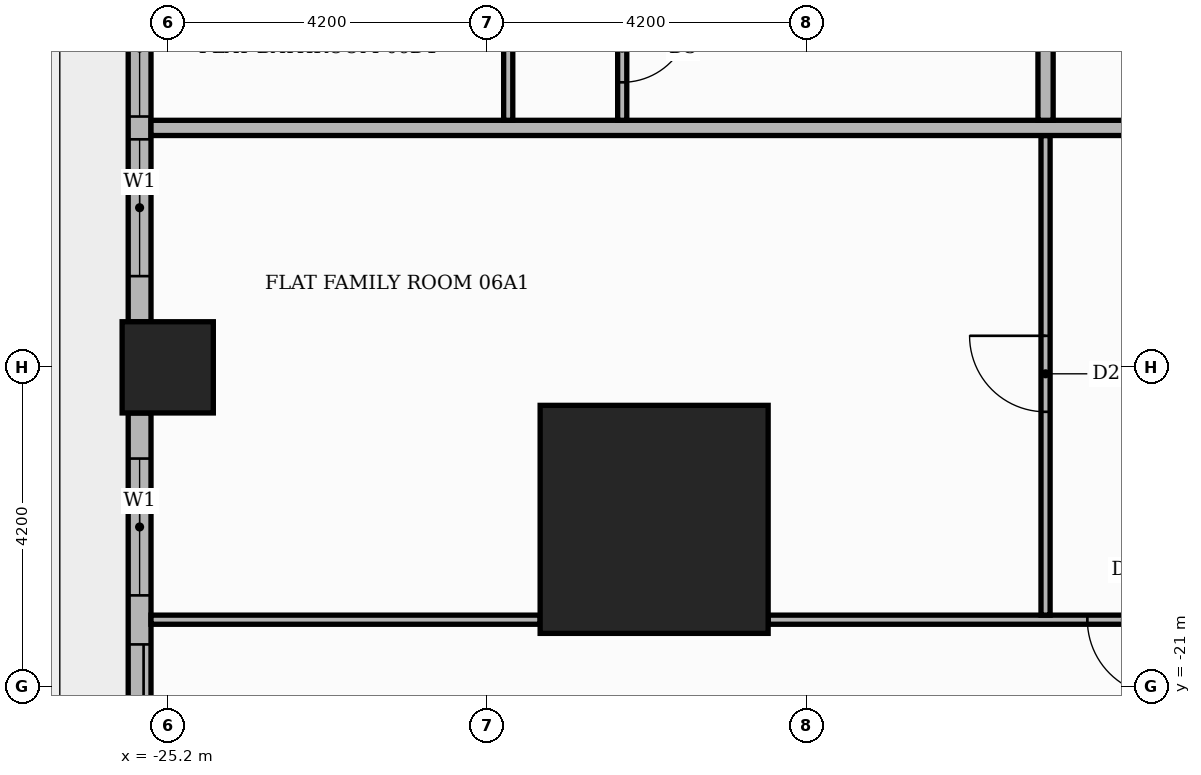
"""IFC4 building model, lengths in metres.
Left out: names, types, materials, properties, quantities, classifications, styles, units other than length and angle.
Written with IfcOpenShell. Run it as: python <this file> out.ifc"""

import sys

from ifc_helpers import new_model, si_unit, direction, frame, frame_2d, origin, origin_2d, place, context, subcontext, project, spatial, rectangle, extrude, element, fill, save


model = new_model("IFC4")
c1 = context("Model", 3, precision=1e-05, world=origin(), true_north=direction((0.0, 1.0)))
c2 = subcontext(c1, "Body", "Model", "MODEL_VIEW")
j1 = project(units=[si_unit("LENGTHUNIT", "METRE"), si_unit("PLANEANGLEUNIT", "RADIAN")], contexts=[c1])
p1 = place(None, origin())
s1 = spatial("IfcSite", under=j1, at=p1, CompositionType="ELEMENT")
p2 = place(p1, origin())
s2 = spatial("IfcBuilding", under=s1, at=p2, CompositionType="ELEMENT")
p3 = place(p2, frame((0.0, 0.0, 30.9)))
s3 = spatial("IfcBuildingStorey", under=s2, at=p3, CompositionType="ELEMENT", Elevation=30.9)
p4 = place(p3, frame((-18.8, -18.8, 0.0), z_axis=(0.0, 0.0, 1.0), x_axis=(1.0, 0.0, 0.0)))
e1 = element("IfcColumn", 1, at=p4, inside=s3, PredefinedType="COLUMN", context=c2, shape_type="SweptSolid", body=[
    extrude(rectangle(XDim=3.0, YDim=3.0, at=origin_2d()), origin(), (0.0, 0.0, 1.0), 3.9),
])
p5 = place(p3, frame((-25.2, -16.8, 0.0), z_axis=(0.0, 0.0, 1.0), x_axis=(1.0, 0.0, 0.0)))
e2 = element("IfcColumn", 2, at=p5, inside=s3, PredefinedType="COLUMN", context=c2, shape_type="SweptSolid", body=[
    extrude(rectangle(XDim=1.2, YDim=1.2, at=origin_2d()), origin(), (0.0, 0.0, 1.0), 3.9),
])
p6 = place(p3, frame((-25.57, -9.0, 0.0), z_axis=(0.0, 0.0, 1.0), x_axis=(0.0, -1.0, 0.0)))
e3 = element("IfcWall", 3, at=p6, inside=s3, PredefinedType="STANDARD", context=c2, shape_type="SweptSolid", body=[
    extrude(rectangle(XDim=7.2, YDim=0.3, at=frame_2d((3.6, 0.0))), origin(), (0.0, 0.0, 1.0), 3.48),
])
p7 = place(p6, frame((0.6, 0.0, 0.9)))
e4 = element("IfcOpeningElement", 4, at=p7, cuts=e3, PredefinedType="OPENING", context=c2, shape_type="SweptSolid", body=[
    extrude(rectangle(XDim=1.8, YDim=2.1, at=frame_2d((0.9, 1.05))), frame((0.0, 0.16, 0.0), z_axis=(0.0, -1.0, 0.0), x_axis=(1.0, 0.0, 0.0)), (0.0, 0.0, 1.0), 0.32),
])
p8 = place(p6, frame((2.7, 0.0, 0.9)))
e5 = element("IfcOpeningElement", 5, at=p8, cuts=e3, PredefinedType="OPENING", context=c2, shape_type="SweptSolid", body=[
    extrude(rectangle(XDim=1.8, YDim=2.1, at=frame_2d((0.9, 1.05))), frame((0.0, 0.16, 0.0), z_axis=(0.0, -1.0, 0.0), x_axis=(1.0, 0.0, 0.0)), (0.0, 0.0, 1.0), 0.32),
])
p9 = place(p6, frame((4.8, 0.0, 0.9)))
e6 = element("IfcOpeningElement", 6, at=p9, cuts=e3, PredefinedType="OPENING", context=c2, shape_type="SweptSolid", body=[
    extrude(rectangle(XDim=1.8, YDim=2.1, at=frame_2d((0.9, 1.05))), frame((0.0, 0.16, 0.0), z_axis=(0.0, -1.0, 0.0), x_axis=(1.0, 0.0, 0.0)), (0.0, 0.0, 1.0), 0.32),
])
p10 = place(p3, frame((-25.57, -17.4, 0.0), z_axis=(0.0, 0.0, 1.0), x_axis=(0.0, -1.0, 0.0)))
e7 = element("IfcWall", 7, at=p10, inside=s3, PredefinedType="STANDARD", context=c2, shape_type="SweptSolid", body=[
    extrude(rectangle(XDim=5.32, YDim=0.3, at=frame_2d((2.66, 0.0))), origin(), (0.0, 0.0, 1.0), 3.48),
])
p11 = place(p10, frame((0.6, 0.0, 0.9)))
e8 = element("IfcOpeningElement", 8, at=p11, cuts=e7, PredefinedType="OPENING", context=c2, shape_type="SweptSolid", body=[
    extrude(rectangle(XDim=1.8, YDim=2.1, at=frame_2d((0.9, 1.05))), frame((0.0, 0.16, 0.0), z_axis=(0.0, -1.0, 0.0), x_axis=(1.0, 0.0, 0.0)), (0.0, 0.0, 1.0), 0.32),
])
p12 = place(p10, frame((3.045, 0.0, 0.0)))
e9 = element("IfcOpeningElement", 9, at=p12, cuts=e7, PredefinedType="OPENING", context=c2, shape_type="SweptSolid", body=[
    extrude(rectangle(XDim=1.8, YDim=2.4, at=frame_2d((0.9, 1.2))), frame((0.0, 0.16, 0.0), z_axis=(0.0, -1.0, 0.0), x_axis=(1.0, 0.0, 0.0)), (0.0, 0.0, 1.0), 0.32),
])
p13 = place(p3, frame((-25.42, -20.12, 0.0), z_axis=(0.0, 0.0, 1.0), x_axis=(1.0, 0.0, 0.0)))
e10 = element("IfcWall", 10, at=p13, inside=s3, PredefinedType="PARTITIONING", context=c2, shape_type="SweptSolid", body=[
    extrude(rectangle(XDim=5.12, YDim=0.12, at=frame_2d((2.56, 0.0))), origin(), (0.0, 0.0, 1.0), 3.48),
])
p14 = place(p3, frame((-17.3, -20.12, 0.0), z_axis=(0.0, 0.0, 1.0), x_axis=(1.0, 0.0, 0.0)))
e11 = element("IfcWall", 11, at=p14, inside=s3, PredefinedType="PARTITIONING", context=c2, shape_type="SweptSolid", body=[
    extrude(rectangle(XDim=14.15, YDim=0.12, at=frame_2d((7.075, 0.0))), origin(), (0.0, 0.0, 1.0), 3.48),
])
p15 = place(p14, frame((4.2, 0.0, 0.0)))
e12 = element("IfcOpeningElement", 12, at=p15, cuts=e11, PredefinedType="OPENING", context=c2, shape_type="SweptSolid", body=[
    extrude(rectangle(XDim=1.0, YDim=2.1, at=frame_2d((0.5, 1.05))), frame((0.0, 0.07, 0.0), z_axis=(0.0, -1.0, 0.0), x_axis=(1.0, 0.0, 0.0)), (0.0, 0.0, 1.0), 0.14),
])
p16 = place(p14, frame((7.4, 0.0, 0.0)))
e13 = element("IfcOpeningElement", 13, at=p16, cuts=e11, PredefinedType="OPENING", context=c2, shape_type="SweptSolid", body=[
    extrude(rectangle(XDim=0.9, YDim=2.1, at=frame_2d((0.45, 1.05))), frame((0.0, 0.07, 0.0), z_axis=(0.0, -1.0, 0.0), x_axis=(1.0, 0.0, 0.0)), (0.0, 0.0, 1.0), 0.14),
])
p17 = place(p3, frame((-13.65, -20.06, 0.0), z_axis=(0.0, 0.0, 1.0), x_axis=(0.0, 1.0, 0.0)))
e14 = element("IfcWall", 14, at=p17, inside=s3, PredefinedType="PARTITIONING", context=c2, shape_type="SweptSolid", body=[
    extrude(rectangle(XDim=6.31, YDim=0.12, at=frame_2d((3.155, 0.0))), origin(), (0.0, 0.0, 1.0), 3.48),
])
p18 = place(p17, frame((2.675, 0.0, 0.0)))
e15 = element("IfcOpeningElement", 15, at=p18, cuts=e14, PredefinedType="OPENING", context=c2, shape_type="SweptSolid", body=[
    extrude(rectangle(XDim=1.0, YDim=2.1, at=frame_2d((0.5, 1.05))), frame((0.0, 0.07, 0.0), z_axis=(0.0, -1.0, 0.0), x_axis=(1.0, 0.0, 0.0)), (0.0, 0.0, 1.0), 0.14),
])
p19 = place(p3, frame((-25.42, -13.65, 0.0), z_axis=(0.0, 0.0, 1.0), x_axis=(1.0, 0.0, 0.0)))
e16 = element("IfcWall", 16, at=p19, inside=s3, PredefinedType="PARTITIONING", context=c2, shape_type="SweptSolid", body=[
    extrude(rectangle(XDim=39.07, YDim=0.2, at=frame_2d((19.535, 0.0))), origin(), (0.0, 0.0, 1.0), 3.48),
])
p20 = place(p19, frame((14.37, 0.0, 0.0)))
e17 = element("IfcOpeningElement", 17, at=p20, cuts=e16, PredefinedType="OPENING", context=c2, shape_type="SweptSolid", body=[
    extrude(rectangle(XDim=1.1, YDim=2.4, at=frame_2d((0.55, 1.2))), frame((0.0, 0.11, 0.0), z_axis=(0.0, -1.0, 0.0), x_axis=(1.0, 0.0, 0.0)), (0.0, 0.0, 1.0), 0.22),
])
p21 = place(p3, frame((-20.72, -13.55, 0.0), z_axis=(0.0, 0.0, 1.0), x_axis=(0.0, 1.0, 0.0)))
e18 = element("IfcWall", 18, at=p21, inside=s3, PredefinedType="PARTITIONING", context=c2, shape_type="SweptSolid", body=[
    extrude(rectangle(XDim=1.94, YDim=0.12, at=frame_2d((0.97, 0.0))), origin(), (0.0, 0.0, 1.0), 3.48),
])
p22 = place(p3, frame((-19.22, -13.55, 0.0), z_axis=(0.0, 0.0, 1.0), x_axis=(0.0, 1.0, 0.0)))
e19 = element("IfcWall", 19, at=p22, inside=s3, PredefinedType="PARTITIONING", context=c2, shape_type="SweptSolid", body=[
    extrude(rectangle(XDim=1.94, YDim=0.12, at=frame_2d((0.97, 0.0))), origin(), (0.0, 0.0, 1.0), 3.48),
])
p23 = place(p22, frame((0.5, 0.0, 0.0)))
e20 = element("IfcOpeningElement", 20, at=p23, cuts=e19, PredefinedType="OPENING", context=c2, shape_type="SweptSolid", body=[
    extrude(rectangle(XDim=0.9, YDim=2.1, at=frame_2d((0.45, 1.05))), frame((0.0, 0.07, 0.0), z_axis=(0.0, -1.0, 0.0), x_axis=(1.0, 0.0, 0.0)), (0.0, 0.0, 1.0), 0.14),
])
p24 = place(p3, frame((-13.65, -13.55, 0.0), z_axis=(0.0, 0.0, 1.0), x_axis=(0.0, 1.0, 0.0)))
e21 = element("IfcWall", 21, at=p24, inside=s3, PredefinedType="PARTITIONING", context=c2, shape_type="SweptSolid", body=[
    extrude(rectangle(XDim=27.1, YDim=0.2, at=frame_2d((13.55, 0.0))), origin(), (0.0, 0.0, 1.0), 3.48),
])
p25 = place(p24, frame((24.55, 0.0, 0.0)))
e22 = element("IfcOpeningElement", 22, at=p25, cuts=e21, PredefinedType="OPENING", context=c2, shape_type="SweptSolid", body=[
    extrude(rectangle(XDim=1.1, YDim=2.4, at=frame_2d((0.55, 1.2))), frame((0.0, 0.11, 0.0), z_axis=(0.0, -1.0, 0.0), x_axis=(1.0, 0.0, 0.0)), (0.0, 0.0, 1.0), 0.22),
])
p26 = place(p8, origin())
e23 = element("IfcWindow", 23, at=p26, inside=s3, PartitioningType="SINGLE_PANEL", PredefinedType="WINDOW", context=c2, shape_type="SweptSolid", body=[
    extrude(rectangle(XDim=1.8, YDim=2.1, at=frame_2d((0.9, 1.05))), frame((0.0, 0.03, 0.0), z_axis=(0.0, -1.0, 0.0), x_axis=(1.0, 0.0, 0.0)), (0.0, 0.0, 1.0), 0.06),
])
fill(e5, e23)
p27 = place(p9, origin())
e24 = element("IfcWindow", 24, at=p27, inside=s3, PartitioningType="SINGLE_PANEL", PredefinedType="WINDOW", context=c2, shape_type="SweptSolid", body=[
    extrude(rectangle(XDim=1.8, YDim=2.1, at=frame_2d((0.9, 1.05))), frame((0.0, 0.03, 0.0), z_axis=(0.0, -1.0, 0.0), x_axis=(1.0, 0.0, 0.0)), (0.0, 0.0, 1.0), 0.06),
])
fill(e6, e24)
p28 = place(p11, origin())
e25 = element("IfcWindow", 25, at=p28, inside=s3, PartitioningType="SINGLE_PANEL", PredefinedType="WINDOW", context=c2, shape_type="SweptSolid", body=[
    extrude(rectangle(XDim=1.8, YDim=2.1, at=frame_2d((0.9, 1.05))), frame((0.0, 0.03, 0.0), z_axis=(0.0, -1.0, 0.0), x_axis=(1.0, 0.0, 0.0)), (0.0, 0.0, 1.0), 0.06),
])
fill(e8, e25)
p29 = place(p12, origin())
e26 = element("IfcDoor", 26, at=p29, inside=s3, OperationType="SLIDING_TO_RIGHT", PredefinedType="DOOR", context=c2, shape_type="SweptSolid", body=[
    extrude(rectangle(XDim=1.8, YDim=2.4, at=frame_2d((0.9, 1.2))), frame((0.0, 0.025, 0.0), z_axis=(0.0, -1.0, 0.0), x_axis=(1.0, 0.0, 0.0)), (0.0, 0.0, 1.0), 0.05),
])
fill(e9, e26)
p30 = place(p18, origin())
e27 = element("IfcDoor", 27, at=p30, inside=s3, OperationType="SINGLE_SWING_RIGHT", PredefinedType="DOOR", context=c2, shape_type="SweptSolid", body=[
    extrude(rectangle(XDim=1.0, YDim=2.1, at=frame_2d((0.5, 1.05))), frame((0.0, 0.025, 0.0), z_axis=(0.0, -1.0, 0.0), x_axis=(1.0, 0.0, 0.0)), (0.0, 0.0, 1.0), 0.05),
])
fill(e15, e27)
p31 = place(p15, frame((1.0, 0.0, 0.0), z_axis=(0.0, 0.0, 1.0), x_axis=(-1.0, 0.0, 0.0)))
e28 = element("IfcDoor", 28, at=p31, inside=s3, OperationType="SINGLE_SWING_RIGHT", PredefinedType="DOOR", context=c2, shape_type="SweptSolid", body=[
    extrude(rectangle(XDim=1.0, YDim=2.1, at=frame_2d((0.5, 1.05))), frame((0.0, 0.025, 0.0), z_axis=(0.0, -1.0, 0.0), x_axis=(1.0, 0.0, 0.0)), (0.0, 0.0, 1.0), 0.05),
])
fill(e12, e28)
p32 = place(p23, frame((0.9, 0.0, 0.0), z_axis=(0.0, 0.0, 1.0), x_axis=(-1.0, 0.0, 0.0)))
e29 = element("IfcDoor", 29, at=p32, inside=s3, OperationType="SINGLE_SWING_RIGHT", PredefinedType="DOOR", context=c2, shape_type="SweptSolid", body=[
    extrude(rectangle(XDim=0.9, YDim=2.1, at=frame_2d((0.45, 1.05))), frame((0.0, 0.025, 0.0), z_axis=(0.0, -1.0, 0.0), x_axis=(1.0, 0.0, 0.0)), (0.0, 0.0, 1.0), 0.05),
])
fill(e20, e29)
save(model, sys.argv[1])
